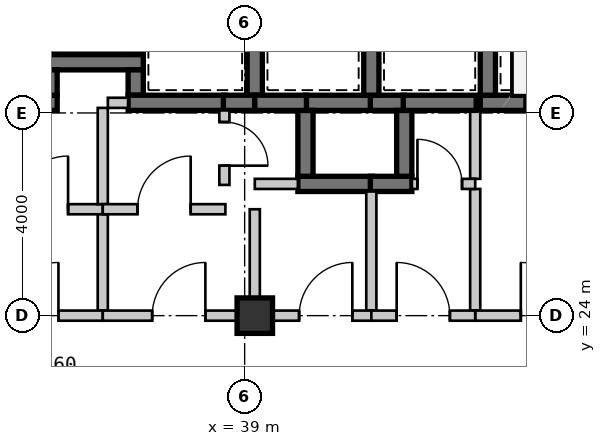
"""IFC4 building model, lengths in metres.
Left out: names, types, materials, properties, quantities, classifications, styles, units other than length and angle.
Written with IfcOpenShell. Run it as: python <this file> out.ifc"""

import sys

from ifc_helpers import new_model, si_unit, direction, frame, frame_2d, origin, origin_2d, place, context, subcontext, project, spatial, rectangle, extrude, source, transform, mapped, element, fill, save


model = new_model("IFC4")
c1 = context("Model", 3, precision=1e-05, world=origin(), true_north=direction((0.0, 1.0)))
c2 = subcontext(c1, "Body", "Model", "MODEL_VIEW")
j1 = project(units=[si_unit("LENGTHUNIT", "METRE"), si_unit("PLANEANGLEUNIT", "RADIAN")], contexts=[c1])
p1 = place(None, origin())
s1 = spatial("IfcSite", under=j1, at=p1, CompositionType="ELEMENT")
p2 = place(p1, origin())
s2 = spatial("IfcBuilding", under=s1, at=p2, CompositionType="ELEMENT")
p3 = place(p2, frame((0.0, 0.0, 99.75)))
s3 = spatial("IfcBuildingStorey", under=s2, at=p3, CompositionType="ELEMENT", Elevation=99.75)
m1 = source(origin(), c2, "Body", "SweptSolid", [
    extrude(rectangle(XDim=0.7, YDim=0.7, at=origin_2d()), origin(), (0.0, 0.0, 1.0), 3.15),
])
p4 = place(p3, frame((39.2, 24.0, 0.0), z_axis=(0.0, 0.0, 1.0), x_axis=(1.0, 0.0, 0.0)))
e1 = element("IfcColumn", 1, at=p4, inside=s3, PredefinedType="COLUMN", context=c2, shape_type="MappedRepresentation", body=[
    mapped(m1, transform((0.0, 0.0, 0.0), scale=1.0)),
])
m2 = source(origin(), c2, "Body", "SweptSolid", [
    extrude(rectangle(XDim=2.9, YDim=0.3, at=frame_2d((1.45, 0.0))), origin(), (0.0, 0.0, 1.0), 2.93),
])
p5 = place(p3, frame((43.65, 28.2, 0.0), z_axis=(0.0, 0.0, 1.0), x_axis=(1.0, 0.0, 0.0)))
e2 = element("IfcWall", 2, at=p5, inside=s3, PredefinedType="SHEAR", context=c2, shape_type="MappedRepresentation", body=[
    mapped(m2, transform((0.0, 0.0, 0.0), scale=1.0)),
])
m3 = source(origin(), c2, "Body", "SweptSolid", [
    extrude(rectangle(XDim=1.1, YDim=2.15, at=frame_2d((0.55, 1.075))), frame((0.0, 0.16, 0.0), z_axis=(0.0, -1.0, 0.0), x_axis=(1.0, 0.0, 0.0)), (0.0, 0.0, 1.0), 0.32),
])
p6 = place(p5, frame((0.9, 0.0, 0.0)))
e3 = element("IfcOpeningElement", 3, at=p6, cuts=e2, PredefinedType="OPENING", context=c2, shape_type="MappedRepresentation", body=[
    mapped(m3, transform((0.0, 0.0, 0.0), scale=1.0)),
])
m4 = source(origin(), c2, "Body", "SweptSolid", [
    extrude(rectangle(XDim=3.5, YDim=0.3, at=frame_2d((1.75, 0.0))), origin(), (0.0, 0.0, 1.0), 2.93),
])
p7 = place(p3, frame((43.8, 31.85, 0.0), z_axis=(0.0, 0.0, 1.0), x_axis=(0.0, -1.0, 0.0)))
e4 = element("IfcWall", 4, at=p7, inside=s3, PredefinedType="SHEAR", context=c2, shape_type="MappedRepresentation", body=[
    mapped(m4, transform((0.0, 0.0, 0.0), scale=1.0)),
])
m5 = source(origin(), c2, "Body", "SweptSolid", [
    extrude(rectangle(XDim=2.4, YDim=0.2, at=frame_2d((1.2, 0.0))), origin(), (0.0, 0.0, 1.0), 2.93),
])
p8 = place(p3, frame((43.55, 26.5, 0.0), z_axis=(0.0, 0.0, 1.0), x_axis=(0.0, -1.0, 0.0)))
e5 = element("IfcWall", 5, at=p8, inside=s3, PredefinedType="SOLIDWALL", context=c2, shape_type="MappedRepresentation", body=[
    mapped(m5, transform((0.0, 0.0, 0.0), scale=1.0)),
])
m6 = source(origin(), c2, "Body", "SweptSolid", [
    extrude(rectangle(XDim=1.35, YDim=0.2, at=frame_2d((0.675, 0.0))), origin(), (0.0, 0.0, 1.0), 2.93),
])
p9 = place(p3, frame((43.55, 28.05, 0.0), z_axis=(0.0, 0.0, 1.0), x_axis=(0.0, -1.0, 0.0)))
e6 = element("IfcWall", 6, at=p9, inside=s3, PredefinedType="SOLIDWALL", context=c2, shape_type="MappedRepresentation", body=[
    mapped(m6, transform((0.0, 0.0, 0.0), scale=1.0)),
])
m7 = source(origin(), c2, "Body", "SweptSolid", [
    extrude(rectangle(XDim=2.7, YDim=0.2, at=frame_2d((1.35, 0.0))), origin(), (0.0, 0.0, 1.0), 2.397),
])
p10 = place(p3, frame((43.55, 24.0, 0.0), z_axis=(0.0, 0.0, 1.0), x_axis=(1.0, 0.0, 0.0)))
e7 = element("IfcWall", 7, at=p10, inside=s3, PredefinedType="SOLIDWALL", context=c2, shape_type="MappedRepresentation", body=[
    mapped(m7, transform((0.0, 0.0, 0.0), scale=1.0)),
])
m8 = source(origin(), c2, "Body", "SweptSolid", [
    extrude(rectangle(XDim=1.05, YDim=2.1, at=frame_2d((0.525, 1.05))), frame((0.0, 0.11, 0.0), z_axis=(0.0, -1.0, 0.0), x_axis=(1.0, 0.0, 0.0)), (0.0, 0.0, 1.0), 0.22),
])
p11 = place(p10, frame((0.9, 0.0, 0.0)))
e8 = element("IfcOpeningElement", 8, at=p11, cuts=e7, PredefinedType="OPENING", context=c2, shape_type="MappedRepresentation", body=[
    mapped(m8, transform((0.0, 0.0, 0.0), scale=1.0)),
])
m9 = source(origin(), c2, "Body", "SweptSolid", [
    extrude(rectangle(XDim=1.2, YDim=0.3, at=frame_2d((0.6, 0.0))), origin(), (0.0, 0.0, 1.0), 2.93),
])
for number, where, z_axis, x_axis in (
    (9, (35.15, 30.35, 0.0), (0.0, 0.0, 1.0), (0.0, -1.0, 0.0)),
    (10, (36.85, 29.15, 0.0), (0.0, 0.0, 1.0), (0.0, 1.0, 0.0)),
):
    element("IfcWall", number, at=place(p3, frame(where, z_axis=z_axis, x_axis=x_axis)), inside=s3, PredefinedType="SHEAR", context=c2, shape_type="MappedRepresentation", body=[
        mapped(m9, transform((0.0, 0.0, 0.0), scale=1.0)),
    ])
m10 = source(origin(), c2, "Body", "SweptSolid", [
    extrude(rectangle(XDim=2.0, YDim=0.3, at=frame_2d((1.0, 0.0))), origin(), (0.0, 0.0, 1.0), 2.93),
])
p12 = place(p3, frame((35.0, 29.0, 0.0), z_axis=(0.0, 0.0, 1.0), x_axis=(1.0, 0.0, 0.0)))
e11 = element("IfcWall", 11, at=p12, inside=s3, PredefinedType="SHEAR", context=c2, shape_type="MappedRepresentation", body=[
    mapped(m10, transform((0.0, 0.0, 0.0), scale=1.0)),
])
m11 = source(origin(), c2, "Body", "SweptSolid", [
    extrude(rectangle(XDim=1.32, YDim=0.3, at=frame_2d((0.66, 0.0))), origin(), (0.0, 0.0, 1.0), 2.93),
])
p13 = place(p3, frame((41.52, 28.2, 0.0), z_axis=(0.0, 0.0, 1.0), x_axis=(-1.0, 0.0, 0.0)))
e12 = element("IfcWall", 12, at=p13, inside=s3, PredefinedType="SHEAR", context=c2, shape_type="MappedRepresentation", body=[
    mapped(m11, transform((0.0, 0.0, 0.0), scale=1.0)),
])
m12 = source(origin(), c2, "Body", "SweptSolid", [
    extrude(rectangle(XDim=0.67, YDim=0.3, at=frame_2d((0.335, 0.0))), origin(), (0.0, 0.0, 1.0), 2.93),
])
p14 = place(p3, frame((42.15, 28.2, 0.0), z_axis=(0.0, 0.0, 1.0), x_axis=(-1.0, 0.0, 0.0)))
e13 = element("IfcWall", 13, at=p14, inside=s3, PredefinedType="SHEAR", context=c2, shape_type="MappedRepresentation", body=[
    mapped(m12, transform((0.0, 0.0, 0.0), scale=1.0)),
])
m13 = source(origin(), c2, "Body", "SweptSolid", [
    extrude(rectangle(XDim=1.47, YDim=0.3, at=frame_2d((0.735, 0.0))), origin(), (0.0, 0.0, 1.0), 2.93),
])
p15 = place(p3, frame((40.05, 26.6, 0.0), z_axis=(0.0, 0.0, 1.0), x_axis=(1.0, 0.0, 0.0)))
e14 = element("IfcWall", 14, at=p15, inside=s3, PredefinedType="SHEAR", context=c2, shape_type="MappedRepresentation", body=[
    mapped(m13, transform((0.0, 0.0, 0.0), scale=1.0)),
])
m14 = source(origin(), c2, "Body", "SweptSolid", [
    extrude(rectangle(XDim=1.3, YDim=0.3, at=frame_2d((0.65, 0.0))), origin(), (0.0, 0.0, 1.0), 2.93),
])
p16 = place(p3, frame((40.2, 28.05, 0.0), z_axis=(0.0, 0.0, 1.0), x_axis=(0.0, -1.0, 0.0)))
e15 = element("IfcWall", 15, at=p16, inside=s3, PredefinedType="SHEAR", context=c2, shape_type="MappedRepresentation", body=[
    mapped(m14, transform((0.0, 0.0, 0.0), scale=1.0)),
])
m15 = source(origin(), c2, "Body", "SweptSolid", [
    extrude(rectangle(XDim=0.82, YDim=0.3, at=frame_2d((0.41, 0.0))), origin(), (0.0, 0.0, 1.0), 2.93),
])
p17 = place(p3, frame((41.48, 26.6, 0.0), z_axis=(0.0, 0.0, 1.0), x_axis=(1.0, 0.0, 0.0)))
e16 = element("IfcWall", 16, at=p17, inside=s3, PredefinedType="SHEAR", context=c2, shape_type="MappedRepresentation", body=[
    mapped(m15, transform((0.0, 0.0, 0.0), scale=1.0)),
])
p18 = place(p3, frame((42.15, 26.75, 0.0), z_axis=(0.0, 0.0, 1.0), x_axis=(0.0, 1.0, 0.0)))
e17 = element("IfcWall", 17, at=p18, inside=s3, PredefinedType="SHEAR", context=c2, shape_type="MappedRepresentation", body=[
    mapped(m14, transform((0.0, 0.0, 0.0), scale=1.0)),
])
m16 = source(origin(), c2, "Body", "SweptSolid", [
    extrude(rectangle(XDim=1.52, YDim=0.3, at=frame_2d((0.76, 0.0))), origin(), (0.0, 0.0, 1.0), 2.93),
])
p19 = place(p3, frame((33.78, 28.2, 0.0), z_axis=(0.0, 0.0, 1.0), x_axis=(1.0, 0.0, 0.0)))
e18 = element("IfcWall", 18, at=p19, inside=s3, PredefinedType="SHEAR", context=c2, shape_type="MappedRepresentation", body=[
    mapped(m16, transform((0.0, 0.0, 0.0), scale=1.0)),
])
m17 = source(origin(), c2, "Body", "SweptSolid", [
    extrude(rectangle(XDim=0.5, YDim=0.3, at=frame_2d((0.25, 0.0))), origin(), (0.0, 0.0, 1.0), 2.93),
])
p20 = place(p3, frame((35.15, 28.35, 0.0), z_axis=(0.0, 0.0, 1.0), x_axis=(0.0, 1.0, 0.0)))
e19 = element("IfcWall", 19, at=p20, inside=s3, PredefinedType="SHEAR", context=c2, shape_type="MappedRepresentation", body=[
    mapped(m17, transform((0.0, 0.0, 0.0), scale=1.0)),
])
p21 = place(p3, frame((39.2, 28.35, 0.0), z_axis=(0.0, 0.0, 1.0), x_axis=(0.0, 1.0, 0.0)))
e20 = element("IfcWall", 20, at=p21, inside=s3, PredefinedType="SHEAR", context=c2, shape_type="MappedRepresentation", body=[
    mapped(m4, transform((0.0, 0.0, 0.0), scale=1.0)),
])
p22 = place(p3, frame((36.85, 28.85, 0.0), z_axis=(0.0, 0.0, 1.0), x_axis=(0.0, -1.0, 0.0)))
e21 = element("IfcWall", 21, at=p22, inside=s3, PredefinedType="SHEAR", context=c2, shape_type="MappedRepresentation", body=[
    mapped(m17, transform((0.0, 0.0, 0.0), scale=1.0)),
])
m18 = source(origin(), c2, "Body", "SweptSolid", [
    extrude(rectangle(XDim=1.92, YDim=0.3, at=frame_2d((0.96, 0.0))), origin(), (0.0, 0.0, 1.0), 2.93),
])
p23 = place(p3, frame((36.7, 28.2, 0.0), z_axis=(0.0, 0.0, 1.0), x_axis=(1.0, 0.0, 0.0)))
e22 = element("IfcWall", 22, at=p23, inside=s3, PredefinedType="SHEAR", context=c2, shape_type="MappedRepresentation", body=[
    mapped(m18, transform((0.0, 0.0, 0.0), scale=1.0)),
])
m19 = source(origin(), c2, "Body", "SweptSolid", [
    extrude(rectangle(XDim=0.62, YDim=0.3, at=frame_2d((0.31, 0.0))), origin(), (0.0, 0.0, 1.0), 2.93),
])
p24 = place(p3, frame((38.58, 28.2, 0.0), z_axis=(0.0, 0.0, 1.0), x_axis=(1.0, 0.0, 0.0)))
e23 = element("IfcWall", 23, at=p24, inside=s3, PredefinedType="SHEAR", context=c2, shape_type="MappedRepresentation", body=[
    mapped(m19, transform((0.0, 0.0, 0.0), scale=1.0)),
])
p25 = place(p3, frame((41.5, 28.35, 0.0), z_axis=(0.0, 0.0, 1.0), x_axis=(0.0, 1.0, 0.0)))
e24 = element("IfcWall", 24, at=p25, inside=s3, PredefinedType="SHEAR", context=c2, shape_type="MappedRepresentation", body=[
    mapped(m4, transform((0.0, 0.0, 0.0), scale=1.0)),
])
m20 = source(origin(), c2, "Body", "SweptSolid", [
    extrude(rectangle(XDim=1.02, YDim=0.3, at=frame_2d((0.51, 0.0))), origin(), (0.0, 0.0, 1.0), 2.93),
])
p26 = place(p3, frame((39.2, 28.2, 0.0), z_axis=(0.0, 0.0, 1.0), x_axis=(1.0, 0.0, 0.0)))
e25 = element("IfcWall", 25, at=p26, inside=s3, PredefinedType="SHEAR", context=c2, shape_type="MappedRepresentation", body=[
    mapped(m20, transform((0.0, 0.0, 0.0), scale=1.0)),
])
m21 = source(origin(), c2, "Body", "SweptSolid", [
    extrude(rectangle(XDim=1.44, YDim=0.3, at=frame_2d((0.72, 0.0))), origin(), (0.0, 0.0, 1.0), 2.93),
])
p27 = place(p3, frame((42.13, 28.2, 0.0), z_axis=(0.0, 0.0, 1.0), x_axis=(1.0, 0.0, 0.0)))
e26 = element("IfcWall", 26, at=p27, inside=s3, PredefinedType="SHEAR", context=c2, shape_type="MappedRepresentation", body=[
    mapped(m21, transform((0.0, 0.0, 0.0), scale=1.0)),
])
m22 = source(origin(), c2, "Body", "SweptSolid", [
    extrude(rectangle(XDim=2.42, YDim=0.2, at=frame_2d((1.21, 0.0))), origin(), (0.0, 0.0, 1.0), 2.93),
])
p28 = place(p3, frame((33.78, 26.1, 0.0), z_axis=(0.0, 0.0, 1.0), x_axis=(1.0, 0.0, 0.0)))
e27 = element("IfcWall", 27, at=p28, inside=s3, PredefinedType="SOLIDWALL", context=c2, shape_type="MappedRepresentation", body=[
    mapped(m22, transform((0.0, 0.0, 0.0), scale=1.0)),
])
p29 = place(p28, frame((0.685, 0.0, 0.0)))
e28 = element("IfcOpeningElement", 28, at=p29, cuts=e27, PredefinedType="OPENING", context=c2, shape_type="MappedRepresentation", body=[
    mapped(m8, transform((0.0, 0.0, 0.0), scale=1.0)),
])
m23 = source(origin(), c2, "Body", "SweptSolid", [
    extrude(rectangle(XDim=1.9, YDim=0.2, at=frame_2d((0.95, 0.0))), origin(), (0.0, 0.0, 1.0), 2.93),
])
p30 = place(p3, frame((36.2, 26.0, 0.0), z_axis=(0.0, 0.0, 1.0), x_axis=(0.0, -1.0, 0.0)))
e29 = element("IfcWall", 29, at=p30, inside=s3, PredefinedType="SOLIDWALL", context=c2, shape_type="MappedRepresentation", body=[
    mapped(m23, transform((0.0, 0.0, 0.0), scale=1.0)),
])
m24 = source(origin(), c2, "Body", "SweptSolid", [
    extrude(rectangle(XDim=2.8, YDim=0.2, at=frame_2d((1.4, 0.0))), origin(), (0.0, 0.0, 1.0), 2.47),
])
p31 = place(p3, frame((36.2, 24.0, 0.0), z_axis=(0.0, 0.0, 1.0), x_axis=(-1.0, 0.0, 0.0)))
e30 = element("IfcWall", 30, at=p31, inside=s3, PredefinedType="SOLIDWALL", context=c2, shape_type="MappedRepresentation", body=[
    mapped(m24, transform((0.0, 0.0, 0.0), scale=1.0)),
])
p32 = place(p31, frame((0.875, 0.0, 0.0)))
e31 = element("IfcOpeningElement", 31, at=p32, cuts=e30, PredefinedType="OPENING", context=c2, shape_type="MappedRepresentation", body=[
    mapped(m8, transform((0.0, 0.0, 0.0), scale=1.0)),
])
m25 = source(origin(), c2, "Body", "SweptSolid", [
    extrude(rectangle(XDim=1.9, YDim=0.2, at=frame_2d((0.95, 0.0))), origin(), (0.0, 0.0, 1.0), 2.93),
])
p33 = place(p3, frame((36.2, 28.1, 0.0), z_axis=(0.0, 0.0, 1.0), x_axis=(0.0, -1.0, 0.0)))
e32 = element("IfcWall", 32, at=p33, inside=s3, PredefinedType="SOLIDWALL", context=c2, shape_type="MappedRepresentation", body=[
    mapped(m25, transform((0.0, 0.0, 0.0), scale=1.0)),
])
m26 = source(origin(), c2, "Body", "SweptSolid", [
    extrude(rectangle(XDim=0.4, YDim=0.2, at=frame_2d((0.2, 0.0))), origin(), (0.0, 0.0, 1.0), 2.93),
])
p34 = place(p3, frame((36.7, 28.2, 0.0), z_axis=(0.0, 0.0, 1.0), x_axis=(-1.0, 0.0, 0.0)))
e33 = element("IfcWall", 33, at=p34, inside=s3, PredefinedType="SOLIDWALL", context=c2, shape_type="MappedRepresentation", body=[
    mapped(m26, transform((0.0, 0.0, 0.0), scale=1.0)),
])
m27 = source(origin(), c2, "Body", "SweptSolid", [
    extrude(rectangle(XDim=2.42, YDim=0.2, at=frame_2d((1.21, 0.0))), origin(), (0.0, 0.0, 1.0), 2.93),
])
p35 = place(p3, frame((36.2, 26.1, 0.0), z_axis=(0.0, 0.0, 1.0), x_axis=(1.0, 0.0, 0.0)))
e34 = element("IfcWall", 34, at=p35, inside=s3, PredefinedType="SOLIDWALL", context=c2, shape_type="MappedRepresentation", body=[
    mapped(m27, transform((0.0, 0.0, 0.0), scale=1.0)),
])
p36 = place(p35, frame((0.685, 0.0, 0.0)))
e35 = element("IfcOpeningElement", 35, at=p36, cuts=e34, PredefinedType="OPENING", context=c2, shape_type="MappedRepresentation", body=[
    mapped(m8, transform((0.0, 0.0, 0.0), scale=1.0)),
])
m28 = source(origin(), c2, "Body", "SweptSolid", [
    extrude(rectangle(XDim=2.0, YDim=0.2, at=frame_2d((1.0, 0.0))), origin(), (0.0, 0.0, 1.0), 2.47),
])
p37 = place(p3, frame((39.2, 26.1, 0.0), z_axis=(0.0, 0.0, 1.0), x_axis=(0.0, -1.0, 0.0)))
e36 = element("IfcWall", 36, at=p37, inside=s3, PredefinedType="SOLIDWALL", context=c2, shape_type="MappedRepresentation", body=[
    mapped(m28, transform((0.0, 0.0, 0.0), scale=1.0)),
])
m29 = source(origin(), c2, "Body", "SweptSolid", [
    extrude(rectangle(XDim=3.0, YDim=0.2, at=frame_2d((1.5, 0.0))), origin(), (0.0, 0.0, 1.0), 2.47),
])
p38 = place(p3, frame((39.2, 24.0, 0.0), z_axis=(0.0, 0.0, 1.0), x_axis=(-1.0, 0.0, 0.0)))
e37 = element("IfcWall", 37, at=p38, inside=s3, PredefinedType="SOLIDWALL", context=c2, shape_type="MappedRepresentation", body=[
    mapped(m29, transform((0.0, 0.0, 0.0), scale=1.0)),
])
p39 = place(p38, frame((0.975, 0.0, 0.0)))
e38 = element("IfcOpeningElement", 38, at=p39, cuts=e37, PredefinedType="OPENING", context=c2, shape_type="MappedRepresentation", body=[
    mapped(m8, transform((0.0, 0.0, 0.0), scale=1.0)),
])
m30 = source(origin(), c2, "Body", "SweptSolid", [
    extrude(rectangle(XDim=1.47, YDim=0.2, at=frame_2d((0.735, 0.0))), origin(), (0.0, 0.0, 1.0), 2.93),
])
p40 = place(p3, frame((38.6, 28.05, 0.0), z_axis=(0.0, 0.0, 1.0), x_axis=(0.0, -1.0, 0.0)))
e39 = element("IfcWall", 39, at=p40, inside=s3, PredefinedType="SOLIDWALL", context=c2, shape_type="MappedRepresentation", body=[
    mapped(m30, transform((0.0, 0.0, 0.0), scale=1.0)),
])
m31 = source(origin(), c2, "Body", "SweptSolid", [
    extrude(rectangle(XDim=0.86, YDim=2.1, at=frame_2d((0.43, 1.05))), frame((0.0, 0.11, 0.0), z_axis=(0.0, -1.0, 0.0), x_axis=(1.0, 0.0, 0.0)), (0.0, 0.0, 1.0), 0.22),
])
p41 = place(p40, frame((0.23, 0.0, 0.0)))
e40 = element("IfcOpeningElement", 40, at=p41, cuts=e39, PredefinedType="OPENING", context=c2, shape_type="MappedRepresentation", body=[
    mapped(m31, transform((0.0, 0.0, 0.0), scale=1.0)),
])
m32 = source(origin(), c2, "Body", "SweptSolid", [
    extrude(rectangle(XDim=0.85, YDim=0.2, at=frame_2d((0.425, 0.0))), origin(), (0.0, 0.0, 1.0), 2.93),
])
p42 = place(p3, frame((39.2, 26.6, 0.0), z_axis=(0.0, 0.0, 1.0), x_axis=(1.0, 0.0, 0.0)))
e41 = element("IfcWall", 41, at=p42, inside=s3, PredefinedType="SOLIDWALL", context=c2, shape_type="MappedRepresentation", body=[
    mapped(m32, transform((0.0, 0.0, 0.0), scale=1.0)),
])
m33 = source(origin(), c2, "Body", "SweptSolid", [
    extrude(rectangle(XDim=2.35, YDim=0.2, at=frame_2d((1.175, 0.0))), origin(), (0.0, 0.0, 1.0), 2.93),
])
p43 = place(p3, frame((41.5, 26.45, 0.0), z_axis=(0.0, 0.0, 1.0), x_axis=(0.0, -1.0, 0.0)))
e42 = element("IfcWall", 42, at=p43, inside=s3, PredefinedType="SOLIDWALL", context=c2, shape_type="MappedRepresentation", body=[
    mapped(m33, transform((0.0, 0.0, 0.0), scale=1.0)),
])
m34 = source(origin(), c2, "Body", "SweptSolid", [
    extrude(rectangle(XDim=2.3, YDim=0.2, at=frame_2d((1.15, 0.0))), origin(), (0.0, 0.0, 1.0), 2.397),
])
p44 = place(p3, frame((41.5, 24.0, 0.0), z_axis=(0.0, 0.0, 1.0), x_axis=(-1.0, 0.0, 0.0)))
e43 = element("IfcWall", 43, at=p44, inside=s3, PredefinedType="SOLIDWALL", context=c2, shape_type="MappedRepresentation", body=[
    mapped(m34, transform((0.0, 0.0, 0.0), scale=1.0)),
])
p45 = place(p44, frame((0.375, 0.0, 0.0)))
e44 = element("IfcOpeningElement", 44, at=p45, cuts=e43, PredefinedType="OPENING", context=c2, shape_type="MappedRepresentation", body=[
    mapped(m8, transform((0.0, 0.0, 0.0), scale=1.0)),
])
m35 = source(origin(), c2, "Body", "SweptSolid", [
    extrude(rectangle(XDim=1.25, YDim=0.2, at=frame_2d((0.625, 0.0))), origin(), (0.0, 0.0, 1.0), 2.93),
])
p46 = place(p3, frame((42.3, 26.6, 0.0), z_axis=(0.0, 0.0, 1.0), x_axis=(1.0, 0.0, 0.0)))
e45 = element("IfcWall", 45, at=p46, inside=s3, PredefinedType="SOLIDWALL", context=c2, shape_type="MappedRepresentation", body=[
    mapped(m35, transform((0.0, 0.0, 0.0), scale=1.0)),
])
m36 = source(origin(), c2, "Body", "SweptSolid", [
    extrude(rectangle(XDim=0.88, YDim=2.1, at=frame_2d((0.44, 1.05))), frame((0.0, 0.11, 0.0), z_axis=(0.0, -1.0, 0.0), x_axis=(1.0, 0.0, 0.0)), (0.0, 0.0, 1.0), 0.22),
])
p47 = place(p46, frame((0.11, 0.0, 0.0)))
e46 = element("IfcOpeningElement", 46, at=p47, cuts=e45, PredefinedType="OPENING", context=c2, shape_type="MappedRepresentation", body=[
    mapped(m36, transform((0.0, 0.0, 0.0), scale=1.0)),
])
m37 = source(origin(), c2, "Body", "SweptSolid", [
    extrude(rectangle(XDim=2.05, YDim=0.2, at=frame_2d((1.025, 0.0))), origin(), (0.0, 0.0, 1.0), 2.397),
])
p48 = place(p3, frame((43.55, 24.0, 0.0), z_axis=(0.0, 0.0, 1.0), x_axis=(-1.0, 0.0, 0.0)))
e47 = element("IfcWall", 47, at=p48, inside=s3, PredefinedType="SOLIDWALL", context=c2, shape_type="MappedRepresentation", body=[
    mapped(m37, transform((0.0, 0.0, 0.0), scale=1.0)),
])
p49 = place(p48, frame((0.5, 0.0, 0.0)))
e48 = element("IfcOpeningElement", 48, at=p49, cuts=e47, PredefinedType="OPENING", context=c2, shape_type="MappedRepresentation", body=[
    mapped(m8, transform((0.0, 0.0, 0.0), scale=1.0)),
])
m38 = source(origin(), c2, "Body", "SweptSolid", [
    extrude(rectangle(XDim=1.1, YDim=2.15, at=frame_2d((0.55, 1.075))), frame((0.0, 0.025, 0.0), z_axis=(0.0, -1.0, 0.0), x_axis=(1.0, 0.0, 0.0)), (0.0, 0.0, 1.0), 0.05),
])
p50 = place(p6, origin())
e49 = element("IfcDoor", 49, at=p50, inside=s3, OperationType="SLIDING_TO_LEFT", PredefinedType="DOOR", context=c2, shape_type="MappedRepresentation", body=[
    mapped(m38, transform((0.0, 0.0, 0.0), scale=1.0)),
])
fill(e3, e49)
m39 = source(origin(), c2, "Body", "SweptSolid", [
    extrude(rectangle(XDim=1.05, YDim=2.1, at=frame_2d((0.525, 1.05))), frame((0.0, 0.025, 0.0), z_axis=(0.0, -1.0, 0.0), x_axis=(1.0, 0.0, 0.0)), (0.0, 0.0, 1.0), 0.05),
])
p51 = place(p11, origin())
e50 = element("IfcDoor", 50, at=p51, inside=s3, OperationType="SINGLE_SWING_LEFT", PredefinedType="DOOR", context=c2, shape_type="MappedRepresentation", body=[
    mapped(m39, transform((0.0, 0.0, 0.0), scale=1.0)),
])
fill(e8, e50)
p52 = place(p29, origin())
e51 = element("IfcDoor", 51, at=p52, inside=s3, OperationType="SINGLE_SWING_RIGHT", PredefinedType="DOOR", context=c2, shape_type="MappedRepresentation", body=[
    mapped(m39, transform((0.0, 0.0, 0.0), scale=1.0)),
])
fill(e28, e51)
p53 = place(p32, frame((1.05, 0.0, 0.0), z_axis=(0.0, 0.0, 1.0), x_axis=(-1.0, 0.0, 0.0)))
e52 = element("IfcDoor", 52, at=p53, inside=s3, OperationType="SINGLE_SWING_RIGHT", PredefinedType="DOOR", context=c2, shape_type="MappedRepresentation", body=[
    mapped(m39, transform((0.0, 0.0, 0.0), scale=1.0)),
])
fill(e31, e52)
p54 = place(p36, origin())
e53 = element("IfcDoor", 53, at=p54, inside=s3, OperationType="SINGLE_SWING_RIGHT", PredefinedType="DOOR", context=c2, shape_type="MappedRepresentation", body=[
    mapped(m39, transform((0.0, 0.0, 0.0), scale=1.0)),
])
fill(e35, e53)
p55 = place(p39, frame((1.05, 0.0, 0.0), z_axis=(0.0, 0.0, 1.0), x_axis=(-1.0, 0.0, 0.0)))
e54 = element("IfcDoor", 54, at=p55, inside=s3, OperationType="SINGLE_SWING_RIGHT", PredefinedType="DOOR", context=c2, shape_type="MappedRepresentation", body=[
    mapped(m39, transform((0.0, 0.0, 0.0), scale=1.0)),
])
fill(e38, e54)
p56 = place(p45, frame((1.05, 0.0, 0.0), z_axis=(0.0, 0.0, 1.0), x_axis=(-1.0, 0.0, 0.0)))
e55 = element("IfcDoor", 55, at=p56, inside=s3, OperationType="SINGLE_SWING_RIGHT", PredefinedType="DOOR", context=c2, shape_type="MappedRepresentation", body=[
    mapped(m39, transform((0.0, 0.0, 0.0), scale=1.0)),
])
fill(e44, e55)
m40 = source(origin(), c2, "Body", "SweptSolid", [
    extrude(rectangle(XDim=0.88, YDim=2.1, at=frame_2d((0.44, 1.05))), frame((0.0, 0.025, 0.0), z_axis=(0.0, -1.0, 0.0), x_axis=(1.0, 0.0, 0.0)), (0.0, 0.0, 1.0), 0.05),
])
p57 = place(p47, origin())
e56 = element("IfcDoor", 56, at=p57, inside=s3, OperationType="SINGLE_SWING_LEFT", PredefinedType="DOOR", context=c2, shape_type="MappedRepresentation", body=[
    mapped(m40, transform((0.0, 0.0, 0.0), scale=1.0)),
])
fill(e46, e56)
p58 = place(p49, frame((1.05, 0.0, 0.0), z_axis=(0.0, 0.0, 1.0), x_axis=(-1.0, 0.0, 0.0)))
e57 = element("IfcDoor", 57, at=p58, inside=s3, OperationType="SINGLE_SWING_LEFT", PredefinedType="DOOR", context=c2, shape_type="MappedRepresentation", body=[
    mapped(m39, transform((0.0, 0.0, 0.0), scale=1.0)),
])
fill(e48, e57)
m41 = source(origin(), c2, "Body", "SweptSolid", [
    extrude(rectangle(XDim=0.86, YDim=2.1, at=frame_2d((0.43, 1.05))), frame((0.0, 0.025, 0.0), z_axis=(0.0, -1.0, 0.0), x_axis=(1.0, 0.0, 0.0)), (0.0, 0.0, 1.0), 0.05),
])
p59 = place(p41, origin())
e58 = element("IfcDoor", 58, at=p59, inside=s3, OperationType="SINGLE_SWING_RIGHT", PredefinedType="DOOR", context=c2, shape_type="MappedRepresentation", body=[
    mapped(m41, transform((0.0, 0.0, 0.0), scale=1.0)),
])
fill(e40, e58)
save(model, sys.argv[1])
